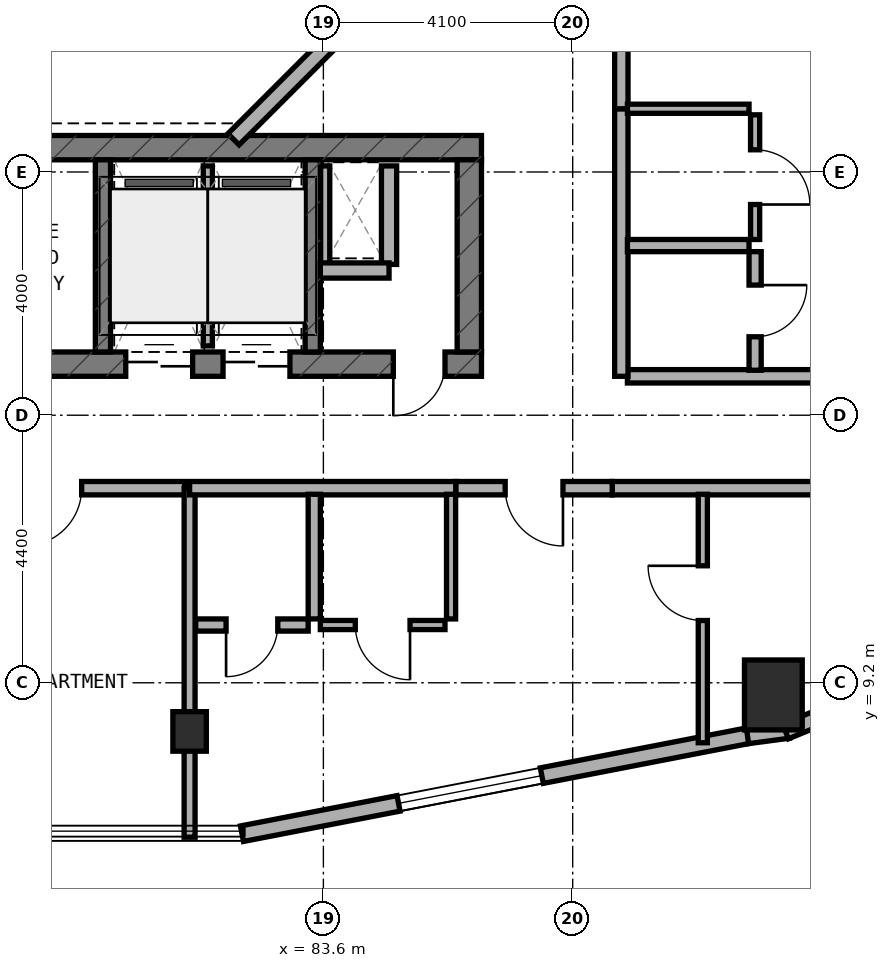
"""IFC4 building model, lengths in metres.
Left out: names, types, materials, properties, quantities, classifications, styles, units other than length and angle.
Written with IfcOpenShell. Run it as: python <this file> out.ifc"""

import sys

from ifc_helpers import new_model, si_unit, direction, frame, frame_2d, origin, origin_2d, place, context, subcontext, project, spatial, rectangle, extrude, element, fill, save


model = new_model("IFC4")
c1 = context("Model", 3, precision=1e-05, world=origin(), true_north=direction((0.0, 1.0)))
c2 = subcontext(c1, "Body", "Model", "MODEL_VIEW")
j1 = project(units=[si_unit("LENGTHUNIT", "METRE"), si_unit("PLANEANGLEUNIT", "RADIAN")], contexts=[c1])
p1 = place(None, origin())
s1 = spatial("IfcSite", under=j1, at=p1, CompositionType="ELEMENT")
p2 = place(p1, origin())
s2 = spatial("IfcBuilding", under=s1, at=p2, CompositionType="ELEMENT")
p3 = place(p2, frame((0.0, 0.0, 109.0)))
s3 = spatial("IfcBuildingStorey", under=s2, at=p3, CompositionType="ELEMENT", Elevation=109.0)
p4 = place(p3, frame((68.0, 14.44, 0.0), z_axis=(0.0, 0.0, 1.0), x_axis=(1.0, 0.0, 0.0)))
e1 = element("IfcWall", 1, at=p4, inside=s3, PredefinedType="SHEAR", context=c2, shape_type="SweptSolid", body=[
    extrude(rectangle(XDim=18.2, YDim=0.4, at=frame_2d((9.1, 0.0))), origin(), (0.0, 0.0, 1.0), 3.5),
])
p5 = place(p4, frame((9.15, 0.0, 0.0)))
e2 = element("IfcOpeningElement", 2, at=p5, cuts=e1, PredefinedType="OPENING", context=c2, shape_type="SweptSolid", body=[
    extrude(rectangle(XDim=1.2, YDim=2.15, at=frame_2d((0.6, 1.075))), frame((0.0, 0.21, 0.0), z_axis=(0.0, -1.0, 0.0), x_axis=(1.0, 0.0, 0.0)), (0.0, 0.0, 1.0), 0.42),
])
p6 = place(p4, frame((16.75, 0.0, 0.0)))
e3 = element("IfcOpeningElement", 3, at=p6, cuts=e1, PredefinedType="OPENING", context=c2, shape_type="SweptSolid", body=[
    extrude(rectangle(XDim=0.85, YDim=2.1, at=frame_2d((0.425, 1.05))), frame((0.0, 0.21, 0.0), z_axis=(0.0, -1.0, 0.0), x_axis=(1.0, 0.0, 0.0)), (0.0, 0.0, 1.0), 0.42),
])
p7 = place(p4, frame((12.35, 0.0, 0.0)))
e4 = element("IfcOpeningElement", 4, at=p7, cuts=e1, PredefinedType="OPENING", context=c2, shape_type="SweptSolid", body=[
    extrude(rectangle(XDim=1.1, YDim=2.15, at=frame_2d((0.55, 1.075))), frame((0.0, 0.21, 0.0), z_axis=(0.0, -1.0, 0.0), x_axis=(1.0, 0.0, 0.0)), (0.0, 0.0, 1.0), 0.42),
])
p8 = place(p4, frame((13.95, 0.0, 0.0)))
e5 = element("IfcOpeningElement", 5, at=p8, cuts=e1, PredefinedType="OPENING", context=c2, shape_type="SweptSolid", body=[
    extrude(rectangle(XDim=1.1, YDim=2.15, at=frame_2d((0.55, 1.075))), frame((0.0, 0.21, 0.0), z_axis=(0.0, -1.0, 0.0), x_axis=(1.0, 0.0, 0.0)), (0.0, 0.0, 1.0), 0.42),
])
p9 = place(p3, frame((68.0, 18.0, 0.0), z_axis=(0.0, 0.0, 1.0), x_axis=(1.0, 0.0, 0.0)))
e6 = element("IfcWall", 6, at=p9, inside=s3, PredefinedType="SHEAR", context=c2, shape_type="SweptSolid", body=[
    extrude(rectangle(XDim=18.2, YDim=0.4, at=frame_2d((9.1, 0.0))), origin(), (0.0, 0.0, 1.0), 3.5),
])
p10 = place(p3, frame((86.0, 14.64, 0.0), z_axis=(0.0, 0.0, 1.0), x_axis=(0.0, 1.0, 0.0)))
e7 = element("IfcWall", 7, at=p10, inside=s3, PredefinedType="SHEAR", context=c2, shape_type="SweptSolid", body=[
    extrude(rectangle(XDim=3.16, YDim=0.4, at=frame_2d((1.58, 0.0))), origin(), (0.0, 0.0, 1.0), 3.5),
])
for number, where, z_axis, x_axis in (
    (8, (79.975, 14.64, 0.0), (0.0, 0.0, 1.0), (0.0, 1.0, 0.0)),
    (9, (83.425, 14.64, 0.0), (0.0, 0.0, 1.0), (0.0, 1.0, 0.0)),
):
    element("IfcWall", number, at=place(p3, frame(where, z_axis=z_axis, x_axis=x_axis)), inside=s3, PredefinedType="STANDARD", context=c2, shape_type="SweptSolid", body=[
        extrude(rectangle(XDim=3.16, YDim=0.25, at=frame_2d((1.58, 0.0))), origin(), (0.0, 0.0, 1.0), 3.25),
    ])
p11 = place(p3, frame((81.4, 8.4, 0.0), z_axis=(0.0, 0.0, 1.0), x_axis=(1.0, 0.0, 0.0)))
e10 = element("IfcColumn", 10, at=p11, inside=s3, PredefinedType="COLUMN", context=c2, shape_type="SweptSolid", body=[
    extrude(rectangle(XDim=0.55, YDim=0.65, at=origin_2d()), origin(), (0.0, 0.0, 1.0), 3.5),
])
p12 = place(p3, frame((91.0, 9.0, 0.0), z_axis=(0.0, 0.0, 1.0), x_axis=(1.0, 0.0, 0.0)))
e11 = element("IfcColumn", 11, at=p12, inside=s3, PredefinedType="COLUMN", context=c2, shape_type="SweptSolid", body=[
    extrude(rectangle(XDim=0.95, YDim=1.15, at=origin_2d()), origin(), (0.0, 0.0, 1.0), 3.5),
])
p13 = place(p3, frame((82.261, 6.718, 0.0), z_axis=(0.0, 0.0, 1.0), x_axis=(0.981750199588, 0.190175039396, 0.0)))
e12 = element("IfcWall", 12, at=p13, inside=s3, PredefinedType="STANDARD", context=c2, shape_type="SweptSolid", body=[
    extrude(rectangle(XDim=8.477, YDim=0.26, at=frame_2d((4.238, 0.0))), origin(), (0.0, 0.0, 1.0), 3.25),
])
p14 = place(p13, frame((2.623, 0.0, 0.8)))
e13 = element("IfcOpeningElement", 13, at=p14, cuts=e12, PredefinedType="OPENING", context=c2, shape_type="SweptSolid", body=[
    extrude(rectangle(XDim=2.4, YDim=1.6, at=frame_2d((1.2, 0.8))), frame((0.0, 0.14, 0.0), z_axis=(0.0, -1.0, 0.0), x_axis=(1.0, 0.0, 0.0)), (0.0, 0.0, 1.0), 0.28),
])
p15 = place(p3, frame((90.575, 8.328, 0.0), z_axis=(0.0, 0.0, 1.0), x_axis=(0.991300187529, 0.13162043232, 0.0)))
e14 = element("IfcWall", 14, at=p15, inside=s3, PredefinedType="STANDARD", context=c2, shape_type="SweptSolid", body=[
    extrude(rectangle(XDim=0.677, YDim=0.26, at=frame_2d((0.338, 0.0))), origin(), (0.0, 0.0, 1.0), 3.25),
])
p16 = place(p3, frame((91.2, 8.399, 0.0), z_axis=(0.0, 0.0, 1.0), x_axis=(0.924093981904, 0.382165294877, 0.0)))
e15 = element("IfcWall", 15, at=p16, inside=s3, PredefinedType="STANDARD", context=c2, shape_type="SweptSolid", body=[
    extrude(rectangle(XDim=0.694, YDim=0.26, at=frame_2d((0.347, 0.0))), origin(), (0.0, 0.0, 1.0), 3.25),
])
p17 = place(p3, frame((82.122, 18.138, 0.0), z_axis=(0.0, 0.0, 1.0), x_axis=(0.707106781187, 0.707106781187, 0.0)))
e16 = element("IfcWall", 16, at=p17, inside=s3, PredefinedType="STANDARD", context=c2, shape_type="SweptSolid", body=[
    extrude(rectangle(XDim=2.311, YDim=0.26, at=frame_2d((1.155, 0.0))), origin(), (0.0, 0.0, 1.0), 3.25),
])
p18 = place(p3, frame((83.63, 16.08, 0.0), z_axis=(0.0, 0.0, 1.0), x_axis=(0.0, 1.0, 0.0)))
e17 = element("IfcWall", 17, at=p18, inside=s3, PredefinedType="PARTITIONING", context=c2, shape_type="SweptSolid", body=[
    extrude(rectangle(XDim=1.62, YDim=0.15, at=frame_2d((0.81, 0.0))), origin(), (0.0, 0.0, 1.0), 2.825),
])
p19 = place(p3, frame((84.68, 16.08, 0.0), z_axis=(0.0, 0.0, 1.0), x_axis=(0.0, 1.0, 0.0)))
e18 = element("IfcWall", 18, at=p19, inside=s3, PredefinedType="SOLIDWALL", context=c2, shape_type="SweptSolid", body=[
    extrude(rectangle(XDim=1.62, YDim=0.25, at=frame_2d((0.81, 0.0))), origin(), (0.0, 0.0, 1.0), 3.22),
])
p20 = place(p3, frame((83.55, 15.98, 0.0), z_axis=(0.0, 0.0, 1.0), x_axis=(1.0, 0.0, 0.0)))
e19 = element("IfcWall", 19, at=p20, inside=s3, PredefinedType="SOLIDWALL", context=c2, shape_type="SweptSolid", body=[
    extrude(rectangle(XDim=1.13, YDim=0.25, at=frame_2d((0.565, 0.0))), origin(), (0.0, 0.0, 1.0), 3.22),
])
p21 = place(p3, frame((81.7, 14.74, 0.0), z_axis=(0.0, 0.0, 1.0), x_axis=(0.0, 1.0, 0.0)))
e20 = element("IfcWall", 20, at=p21, inside=s3, PredefinedType="PARTITIONING", context=c2, shape_type="SweptSolid", body=[
    extrude(rectangle(XDim=2.96, YDim=0.15, at=frame_2d((1.48, 0.0))), origin(), (0.0, 0.0, 1.0), 3.22),
])
p22 = place(p3, frame((76.98, 12.4, 0.0), z_axis=(0.0, 0.0, 1.0), x_axis=(1.0, 0.0, 0.0)))
e21 = element("IfcWall", 21, at=p22, inside=s3, PredefinedType="SOLIDWALL", context=c2, shape_type="SweptSolid", body=[
    extrude(rectangle(XDim=4.34, YDim=0.22, at=frame_2d((2.17, 0.0))), origin(), (0.0, 0.0, 1.0), 2.825),
])
p23 = place(p22, frame((1.695, 0.0, 0.0)))
e22 = element("IfcOpeningElement", 22, at=p23, cuts=e21, PredefinedType="OPENING", context=c2, shape_type="SweptSolid", body=[
    extrude(rectangle(XDim=0.95, YDim=2.1, at=frame_2d((0.475, 1.05))), frame((0.0, 0.12, 0.0), z_axis=(0.0, -1.0, 0.0), x_axis=(1.0, 0.0, 0.0)), (0.0, 0.0, 1.0), 0.24),
])
p24 = place(p3, frame((81.4, 6.66, 0.0), z_axis=(0.0, 0.0, 1.0), x_axis=(0.0, 1.0, 0.0)))
e23 = element("IfcWall", 23, at=p24, inside=s3, PredefinedType="SOLIDWALL", context=c2, shape_type="SweptSolid", body=[
    extrude(rectangle(XDim=5.74, YDim=0.18, at=frame_2d((2.87, 0.0))), origin(), (0.0, 0.0, 1.0), 2.825),
])
p25 = place(p3, frame((81.4, 12.4, 0.0), z_axis=(0.0, 0.0, 1.0), x_axis=(1.0, 0.0, 0.0)))
e24 = element("IfcWall", 24, at=p25, inside=s3, PredefinedType="SOLIDWALL", context=c2, shape_type="SweptSolid", body=[
    extrude(rectangle(XDim=4.38, YDim=0.22, at=frame_2d((2.19, 0.0))), origin(), (0.0, 0.0, 1.0), 2.825),
])
p26 = place(p3, frame((88.35, 12.4, 0.0), z_axis=(0.0, 0.0, 1.0), x_axis=(1.0, 0.0, 0.0)))
e25 = element("IfcWall", 25, at=p26, inside=s3, PredefinedType="SOLIDWALL", context=c2, shape_type="SweptSolid", body=[
    extrude(rectangle(XDim=6.29, YDim=0.22, at=frame_2d((3.145, 0.0))), origin(), (0.0, 0.0, 1.0), 2.945),
])
p27 = place(p3, frame((85.78, 12.4, 0.0), z_axis=(0.0, 0.0, 1.0), x_axis=(1.0, 0.0, 0.0)))
e26 = element("IfcWall", 26, at=p27, inside=s3, PredefinedType="SOLIDWALL", context=c2, shape_type="SweptSolid", body=[
    extrude(rectangle(XDim=2.57, YDim=0.22, at=frame_2d((1.285, 0.0))), origin(), (0.0, 0.0, 1.0), 3.22),
])
p28 = place(p27, frame((0.81, 0.0, 0.0)))
e27 = element("IfcOpeningElement", 27, at=p28, cuts=e26, PredefinedType="OPENING", context=c2, shape_type="SweptSolid", body=[
    extrude(rectangle(XDim=0.95, YDim=2.1, at=frame_2d((0.475, 1.05))), frame((0.0, 0.12, 0.0), z_axis=(0.0, -1.0, 0.0), x_axis=(1.0, 0.0, 0.0)), (0.0, 0.0, 1.0), 0.24),
])
p29 = place(p3, frame((89.84, 8.214, 0.0), z_axis=(0.0, 0.0, 1.0), x_axis=(0.0, 1.0, 0.0)))
e28 = element("IfcWall", 28, at=p29, inside=s3, PredefinedType="PARTITIONING", context=c2, shape_type="SweptSolid", body=[
    extrude(rectangle(XDim=4.086, YDim=0.15, at=frame_2d((2.043, 0.0))), origin(), (0.0, 0.0, 1.0), 2.945),
])
p30 = place(p29, frame((2.01, 0.0, 0.0)))
e29 = element("IfcOpeningElement", 29, at=p30, cuts=e28, PredefinedType="OPENING", context=c2, shape_type="SweptSolid", body=[
    extrude(rectangle(XDim=0.9, YDim=2.1, at=frame_2d((0.45, 1.05))), frame((0.0, 0.085, 0.0), z_axis=(0.0, -1.0, 0.0), x_axis=(1.0, 0.0, 0.0)), (0.0, 0.0, 1.0), 0.17),
])
p31 = place(p3, frame((83.45, 10.25, 0.0), z_axis=(0.0, 0.0, 1.0), x_axis=(0.0, 1.0, 0.0)))
e30 = element("IfcWall", 30, at=p31, inside=s3, PredefinedType="PLUMBINGWALL", context=c2, shape_type="SweptSolid", body=[
    extrude(rectangle(XDim=2.05, YDim=0.2, at=frame_2d((1.025, 0.0))), origin(), (0.0, 0.0, 1.0), 3.22),
])
p32 = place(p3, frame((85.7, 10.25, 0.0), z_axis=(0.0, 0.0, 1.0), x_axis=(0.0, 1.0, 0.0)))
e31 = element("IfcWall", 31, at=p32, inside=s3, PredefinedType="PARTITIONING", context=c2, shape_type="SweptSolid", body=[
    extrude(rectangle(XDim=2.05, YDim=0.15, at=frame_2d((1.025, 0.0))), origin(), (0.0, 0.0, 1.0), 3.22),
])
p33 = place(p3, frame((81.5, 10.15, 0.0), z_axis=(0.0, 0.0, 1.0), x_axis=(1.0, 0.0, 0.0)))
e32 = element("IfcWall", 32, at=p33, inside=s3, PredefinedType="PLUMBINGWALL", context=c2, shape_type="SweptSolid", body=[
    extrude(rectangle(XDim=1.85, YDim=0.2, at=frame_2d((0.925, 0.0))), origin(), (0.0, 0.0, 1.0), 2.825),
])
p34 = place(p33, frame((0.5, 0.0, 0.0)))
e33 = element("IfcOpeningElement", 33, at=p34, cuts=e32, PredefinedType="OPENING", context=c2, shape_type="SweptSolid", body=[
    extrude(rectangle(XDim=0.85, YDim=2.1, at=frame_2d((0.425, 1.05))), frame((0.0, 0.11, 0.0), z_axis=(0.0, -1.0, 0.0), x_axis=(1.0, 0.0, 0.0)), (0.0, 0.0, 1.0), 0.22),
])
p35 = place(p3, frame((83.55, 10.15, 0.0), z_axis=(0.0, 0.0, 1.0), x_axis=(1.0, 0.0, 0.0)))
e34 = element("IfcWall", 34, at=p35, inside=s3, PredefinedType="PARTITIONING", context=c2, shape_type="SweptSolid", body=[
    extrude(rectangle(XDim=2.05, YDim=0.15, at=frame_2d((1.025, 0.0))), origin(), (0.0, 0.0, 1.0), 3.22),
])
p36 = place(p35, frame((0.575, 0.0, 0.0)))
e35 = element("IfcOpeningElement", 35, at=p36, cuts=e34, PredefinedType="OPENING", context=c2, shape_type="SweptSolid", body=[
    extrude(rectangle(XDim=0.9, YDim=2.1, at=frame_2d((0.45, 1.05))), frame((0.0, 0.085, 0.0), z_axis=(0.0, -1.0, 0.0), x_axis=(1.0, 0.0, 0.0)), (0.0, 0.0, 1.0), 0.17),
])
p37 = place(p3, frame((88.6, 14.24, 0.0), z_axis=(0.0, 0.0, 1.0), x_axis=(1.0, 0.0, 0.0)))
e36 = element("IfcWall", 36, at=p37, inside=s3, PredefinedType="SOLIDWALL", context=c2, shape_type="SweptSolid", body=[
    extrude(rectangle(XDim=5.88, YDim=0.22, at=frame_2d((2.94, 0.0))), origin(), (0.0, 0.0, 1.0), 2.945),
])
p38 = place(p3, frame((88.5, 14.24, 0.0), z_axis=(0.0, 0.0, 1.0), x_axis=(0.0, 1.0, 0.0)))
e37 = element("IfcWall", 37, at=p38, inside=s3, PredefinedType="SOLIDWALL", context=c2, shape_type="SweptSolid", body=[
    extrude(rectangle(XDim=4.4, YDim=0.22, at=frame_2d((2.2, 0.0))), origin(), (0.0, 0.0, 1.0), 3.22),
])
p39 = place(p3, frame((88.5, 18.64, 0.0), z_axis=(0.0, 0.0, 1.0), x_axis=(0.0, 1.0, 0.0)))
e38 = element("IfcWall", 38, at=p39, inside=s3, PredefinedType="SOLIDWALL", context=c2, shape_type="SweptSolid", body=[
    extrude(rectangle(XDim=3.36, YDim=0.22, at=frame_2d((1.68, 0.0))), origin(), (0.0, 0.0, 1.0), 2.825),
])
p40 = place(p39, frame((1.205, 0.0, 0.0)))
e39 = element("IfcOpeningElement", 39, at=p40, cuts=e38, PredefinedType="OPENING", context=c2, shape_type="SweptSolid", body=[
    extrude(rectangle(XDim=0.95, YDim=2.1, at=frame_2d((0.475, 1.05))), frame((0.0, 0.12, 0.0), z_axis=(0.0, -1.0, 0.0), x_axis=(1.0, 0.0, 0.0)), (0.0, 0.0, 1.0), 0.24),
])
p41 = place(p3, frame((88.6, 16.39, 0.0), z_axis=(0.0, 0.0, 1.0), x_axis=(1.0, 0.0, 0.0)))
e40 = element("IfcWall", 40, at=p41, inside=s3, PredefinedType="PLUMBINGWALL", context=c2, shape_type="SweptSolid", body=[
    extrude(rectangle(XDim=2.0, YDim=0.2, at=frame_2d((1.0, 0.0))), origin(), (0.0, 0.0, 1.0), 3.22),
])
p42 = place(p3, frame((88.6, 18.64, 0.0), z_axis=(0.0, 0.0, 1.0), x_axis=(1.0, 0.0, 0.0)))
e41 = element("IfcWall", 41, at=p42, inside=s3, PredefinedType="PARTITIONING", context=c2, shape_type="SweptSolid", body=[
    extrude(rectangle(XDim=2.0, YDim=0.15, at=frame_2d((1.0, 0.0))), origin(), (0.0, 0.0, 1.0), 3.22),
])
p43 = place(p3, frame((90.7, 14.34, 0.0), z_axis=(0.0, 0.0, 1.0), x_axis=(0.0, 1.0, 0.0)))
e42 = element("IfcWall", 42, at=p43, inside=s3, PredefinedType="PLUMBINGWALL", context=c2, shape_type="SweptSolid", body=[
    extrude(rectangle(XDim=1.95, YDim=0.2, at=frame_2d((0.975, 0.0))), origin(), (0.0, 0.0, 1.0), 3.22),
])
p44 = place(p43, frame((0.55, 0.0, 0.0)))
e43 = element("IfcOpeningElement", 43, at=p44, cuts=e42, PredefinedType="OPENING", context=c2, shape_type="SweptSolid", body=[
    extrude(rectangle(XDim=0.85, YDim=2.1, at=frame_2d((0.425, 1.05))), frame((0.0, 0.11, 0.0), z_axis=(0.0, -1.0, 0.0), x_axis=(1.0, 0.0, 0.0)), (0.0, 0.0, 1.0), 0.22),
])
p45 = place(p3, frame((90.7, 16.49, 0.0), z_axis=(0.0, 0.0, 1.0), x_axis=(0.0, 1.0, 0.0)))
e44 = element("IfcWall", 44, at=p45, inside=s3, PredefinedType="PARTITIONING", context=c2, shape_type="SweptSolid", body=[
    extrude(rectangle(XDim=2.05, YDim=0.15, at=frame_2d((1.025, 0.0))), origin(), (0.0, 0.0, 1.0), 3.22),
])
p46 = place(p45, frame((0.575, 0.0, 0.0)))
e45 = element("IfcOpeningElement", 45, at=p46, cuts=e44, PredefinedType="OPENING", context=c2, shape_type="SweptSolid", body=[
    extrude(rectangle(XDim=0.9, YDim=2.1, at=frame_2d((0.45, 1.05))), frame((0.0, 0.085, 0.0), z_axis=(0.0, -1.0, 0.0), x_axis=(1.0, 0.0, 0.0)), (0.0, 0.0, 1.0), 0.17),
])
p47 = place(p14, origin())
e46 = element("IfcWindow", 46, at=p47, inside=s3, PartitioningType="SINGLE_PANEL", PredefinedType="WINDOW", context=c2, shape_type="SweptSolid", body=[
    extrude(rectangle(XDim=2.4, YDim=1.6, at=frame_2d((1.2, 0.8))), frame((0.0, 0.03, 0.0), z_axis=(0.0, -1.0, 0.0), x_axis=(1.0, 0.0, 0.0)), (0.0, 0.0, 1.0), 0.06),
])
fill(e13, e46)
p48 = place(p6, frame((0.85, 0.0, 0.0), z_axis=(0.0, 0.0, 1.0), x_axis=(-1.0, 0.0, 0.0)))
e47 = element("IfcDoor", 47, at=p48, inside=s3, OperationType="SINGLE_SWING_RIGHT", PredefinedType="DOOR", context=c2, shape_type="SweptSolid", body=[
    extrude(rectangle(XDim=0.85, YDim=2.1, at=frame_2d((0.425, 1.05))), frame((0.0, 0.025, 0.0), z_axis=(0.0, -1.0, 0.0), x_axis=(1.0, 0.0, 0.0)), (0.0, 0.0, 1.0), 0.05),
])
fill(e3, e47)
p49 = place(p7, frame((1.1, 0.0, 0.0), z_axis=(0.0, 0.0, 1.0), x_axis=(-1.0, 0.0, 0.0)))
e48 = element("IfcDoor", 48, at=p49, inside=s3, OperationType="DOUBLE_DOOR_SLIDING", PredefinedType="DOOR", context=c2, shape_type="SweptSolid", body=[
    extrude(rectangle(XDim=1.1, YDim=2.15, at=frame_2d((0.55, 1.075))), frame((0.0, 0.025, 0.0), z_axis=(0.0, -1.0, 0.0), x_axis=(1.0, 0.0, 0.0)), (0.0, 0.0, 1.0), 0.05),
])
fill(e4, e48)
p50 = place(p8, frame((1.1, 0.0, 0.0), z_axis=(0.0, 0.0, 1.0), x_axis=(-1.0, 0.0, 0.0)))
e49 = element("IfcDoor", 49, at=p50, inside=s3, OperationType="DOUBLE_DOOR_SLIDING", PredefinedType="DOOR", context=c2, shape_type="SweptSolid", body=[
    extrude(rectangle(XDim=1.1, YDim=2.15, at=frame_2d((0.55, 1.075))), frame((0.0, 0.025, 0.0), z_axis=(0.0, -1.0, 0.0), x_axis=(1.0, 0.0, 0.0)), (0.0, 0.0, 1.0), 0.05),
])
fill(e5, e49)
p51 = place(p23, frame((0.95, 0.0, 0.0), z_axis=(0.0, 0.0, 1.0), x_axis=(-1.0, 0.0, 0.0)))
e50 = element("IfcDoor", 50, at=p51, inside=s3, OperationType="SINGLE_SWING_RIGHT", PredefinedType="DOOR", context=c2, shape_type="SweptSolid", body=[
    extrude(rectangle(XDim=0.95, YDim=2.1, at=frame_2d((0.475, 1.05))), frame((0.0, 0.025, 0.0), z_axis=(0.0, -1.0, 0.0), x_axis=(1.0, 0.0, 0.0)), (0.0, 0.0, 1.0), 0.05),
])
fill(e22, e50)
p52 = place(p28, frame((0.95, 0.0, 0.0), z_axis=(0.0, 0.0, 1.0), x_axis=(-1.0, 0.0, 0.0)))
e51 = element("IfcDoor", 51, at=p52, inside=s3, OperationType="SINGLE_SWING_LEFT", PredefinedType="DOOR", context=c2, shape_type="SweptSolid", body=[
    extrude(rectangle(XDim=0.95, YDim=2.1, at=frame_2d((0.475, 1.05))), frame((0.0, 0.025, 0.0), z_axis=(0.0, -1.0, 0.0), x_axis=(1.0, 0.0, 0.0)), (0.0, 0.0, 1.0), 0.05),
])
fill(e27, e51)
p53 = place(p30, origin())
e52 = element("IfcDoor", 52, at=p53, inside=s3, OperationType="SINGLE_SWING_RIGHT", PredefinedType="DOOR", context=c2, shape_type="SweptSolid", body=[
    extrude(rectangle(XDim=0.9, YDim=2.1, at=frame_2d((0.45, 1.05))), frame((0.0, 0.025, 0.0), z_axis=(0.0, -1.0, 0.0), x_axis=(1.0, 0.0, 0.0)), (0.0, 0.0, 1.0), 0.05),
])
fill(e29, e52)
p54 = place(p34, frame((0.85, 0.0, 0.0), z_axis=(0.0, 0.0, 1.0), x_axis=(-1.0, 0.0, 0.0)))
e53 = element("IfcDoor", 53, at=p54, inside=s3, OperationType="SINGLE_SWING_RIGHT", PredefinedType="DOOR", context=c2, shape_type="SweptSolid", body=[
    extrude(rectangle(XDim=0.85, YDim=2.1, at=frame_2d((0.425, 1.05))), frame((0.0, 0.025, 0.0), z_axis=(0.0, -1.0, 0.0), x_axis=(1.0, 0.0, 0.0)), (0.0, 0.0, 1.0), 0.05),
])
fill(e33, e53)
p55 = place(p36, frame((0.9, 0.0, 0.0), z_axis=(0.0, 0.0, 1.0), x_axis=(-1.0, 0.0, 0.0)))
e54 = element("IfcDoor", 54, at=p55, inside=s3, OperationType="SINGLE_SWING_LEFT", PredefinedType="DOOR", context=c2, shape_type="SweptSolid", body=[
    extrude(rectangle(XDim=0.9, YDim=2.1, at=frame_2d((0.45, 1.05))), frame((0.0, 0.025, 0.0), z_axis=(0.0, -1.0, 0.0), x_axis=(1.0, 0.0, 0.0)), (0.0, 0.0, 1.0), 0.05),
])
fill(e35, e54)
p56 = place(p44, frame((0.85, 0.0, 0.0), z_axis=(0.0, 0.0, 1.0), x_axis=(-1.0, 0.0, 0.0)))
e55 = element("IfcDoor", 55, at=p56, inside=s3, OperationType="SINGLE_SWING_LEFT", PredefinedType="DOOR", context=c2, shape_type="SweptSolid", body=[
    extrude(rectangle(XDim=0.85, YDim=2.1, at=frame_2d((0.425, 1.05))), frame((0.0, 0.025, 0.0), z_axis=(0.0, -1.0, 0.0), x_axis=(1.0, 0.0, 0.0)), (0.0, 0.0, 1.0), 0.05),
])
fill(e43, e55)
p57 = place(p46, frame((0.9, 0.0, 0.0), z_axis=(0.0, 0.0, 1.0), x_axis=(-1.0, 0.0, 0.0)))
e56 = element("IfcDoor", 56, at=p57, inside=s3, OperationType="SINGLE_SWING_RIGHT", PredefinedType="DOOR", context=c2, shape_type="SweptSolid", body=[
    extrude(rectangle(XDim=0.9, YDim=2.1, at=frame_2d((0.45, 1.05))), frame((0.0, 0.025, 0.0), z_axis=(0.0, -1.0, 0.0), x_axis=(1.0, 0.0, 0.0)), (0.0, 0.0, 1.0), 0.05),
])
fill(e45, e56)
save(model, sys.argv[1])
